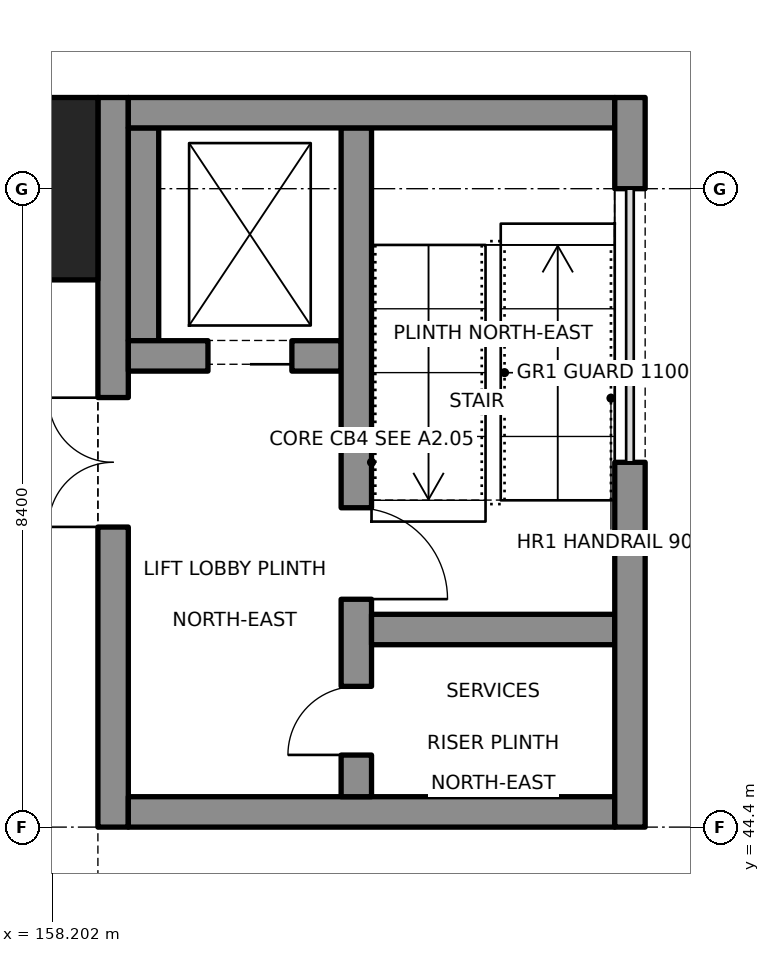
"""IFC4 building model, lengths in metres.
Left out: names, types, materials, properties, quantities, classifications, styles, units other than length and angle.
Written with IfcOpenShell. Run it as: python <this file> out.ifc"""

import sys

from ifc_helpers import new_model, si_unit, direction, frame, frame_2d, origin, origin_2d, place, context, subcontext, project, spatial, rectangle, extrude, element, fill, save


model = new_model("IFC4")
c1 = context("Model", 3, precision=1e-05, world=origin(), true_north=direction((0.0, 1.0)))
c2 = subcontext(c1, "Body", "Model", "MODEL_VIEW")
j1 = project(units=[si_unit("LENGTHUNIT", "METRE"), si_unit("PLANEANGLEUNIT", "RADIAN")], contexts=[c1])
p1 = place(None, origin())
s1 = spatial("IfcSite", under=j1, at=p1, CompositionType="ELEMENT")
p2 = place(p1, origin())
s2 = spatial("IfcBuilding", under=s1, at=p2, CompositionType="ELEMENT")
p3 = place(p2, frame((0.0, 0.0, 4.4)))
s3 = spatial("IfcBuildingStorey", under=s2, at=p3, CompositionType="ELEMENT", Elevation=4.4)
p4 = place(p3, frame((157.6, 52.8, 0.0), z_axis=(0.0, 0.0, 1.0), x_axis=(1.0, 0.0, 0.0)))
e1 = element("IfcColumn", 1, at=p4, inside=s3, PredefinedType="COLUMN", context=c2, shape_type="SweptSolid", body=[
    extrude(rectangle(XDim=2.4, YDim=2.4, at=origin_2d()), origin(), (0.0, 0.0, 1.0), 4.4),
])
p5 = place(p3, frame((165.8, 49.2, 0.0), z_axis=(0.0, 0.0, 1.0), x_axis=(0.0, -1.0, 0.0)))
e2 = element("IfcWall", 2, at=p5, inside=s3, PredefinedType="SHEAR", context=c2, shape_type="SweptSolid", body=[
    extrude(rectangle(XDim=4.8, YDim=0.4, at=frame_2d((2.4, 0.0))), origin(), (0.0, 0.0, 1.0), 4.4),
])
p6 = place(p3, frame((165.8, 54.0, 0.0), z_axis=(0.0, 0.0, 1.0), x_axis=(0.0, -1.0, 0.0)))
e3 = element("IfcWall", 3, at=p6, inside=s3, PredefinedType="SHEAR", context=c2, shape_type="SweptSolid", body=[
    extrude(rectangle(XDim=1.2, YDim=0.4, at=frame_2d((0.6, 0.0))), origin(), (0.0, 0.0, 1.0), 4.4),
])
p7 = place(p3, frame((159.0, 44.4, 0.0), z_axis=(0.0, 0.0, 1.0), x_axis=(0.0, 1.0, 0.0)))
e4 = element("IfcWall", 4, at=p7, inside=s3, PredefinedType="SHEAR", context=c2, shape_type="SweptSolid", body=[
    extrude(rectangle(XDim=9.6, YDim=0.4, at=frame_2d((4.8, 0.0))), origin(), (0.0, 0.0, 1.0), 4.4),
])
p8 = place(p7, frame((3.95, 0.0, 0.0)))
e5 = element("IfcOpeningElement", 5, at=p8, cuts=e4, PredefinedType="OPENING", context=c2, shape_type="SweptSolid", body=[
    extrude(rectangle(XDim=1.7, YDim=2.1, at=frame_2d((0.85, 1.05))), frame((0.0, 0.21, 0.0), z_axis=(0.0, -1.0, 0.0), x_axis=(1.0, 0.0, 0.0)), (0.0, 0.0, 1.0), 0.42),
])
for number, where, z_axis, x_axis in (
    (6, (159.2, 53.8, 0.0), (0.0, 0.0, 1.0), (1.0, 0.0, 0.0)),
    (7, (159.2, 44.6, 0.0), (0.0, 0.0, 1.0), (1.0, 0.0, 0.0)),
):
    element("IfcWall", number, at=place(p3, frame(where, z_axis=z_axis, x_axis=x_axis)), inside=s3, PredefinedType="SHEAR", context=c2, shape_type="SweptSolid", body=[
        extrude(rectangle(XDim=6.4, YDim=0.4, at=frame_2d((3.2, 0.0))), origin(), (0.0, 0.0, 1.0), 4.4),
    ])
p9 = place(p3, frame((162.2, 44.8, 0.0), z_axis=(0.0, 0.0, 1.0), x_axis=(0.0, 1.0, 0.0)))
e8 = element("IfcWall", 8, at=p9, inside=s3, PredefinedType="SHEAR", context=c2, shape_type="SweptSolid", body=[
    extrude(rectangle(XDim=8.8, YDim=0.4, at=frame_2d((4.4, 0.0))), origin(), (0.0, 0.0, 1.0), 4.4),
])
p10 = place(p9, frame((2.6, 0.0, 0.0)))
e9 = element("IfcOpeningElement", 9, at=p10, cuts=e8, PredefinedType="OPENING", context=c2, shape_type="SweptSolid", body=[
    extrude(rectangle(XDim=1.2, YDim=2.1, at=frame_2d((0.6, 1.05))), frame((0.0, 0.21, 0.0), z_axis=(0.0, -1.0, 0.0), x_axis=(1.0, 0.0, 0.0)), (0.0, 0.0, 1.0), 0.42),
])
p11 = place(p9, frame((0.55, 0.0, 0.0)))
e10 = element("IfcOpeningElement", 10, at=p11, cuts=e8, PredefinedType="OPENING", context=c2, shape_type="SweptSolid", body=[
    extrude(rectangle(XDim=0.9, YDim=2.1, at=frame_2d((0.45, 1.05))), frame((0.0, 0.21, 0.0), z_axis=(0.0, -1.0, 0.0), x_axis=(1.0, 0.0, 0.0)), (0.0, 0.0, 1.0), 0.42),
])
p12 = place(p3, frame((162.4, 47.0, 0.0), z_axis=(0.0, 0.0, 1.0), x_axis=(1.0, 0.0, 0.0)))
e11 = element("IfcWall", 11, at=p12, inside=s3, PredefinedType="SHEAR", context=c2, shape_type="SweptSolid", body=[
    extrude(rectangle(XDim=3.2, YDim=0.4, at=frame_2d((1.6, 0.0))), origin(), (0.0, 0.0, 1.0), 4.4),
])
p13 = place(p3, frame((159.2, 50.6, 0.0), z_axis=(0.0, 0.0, 1.0), x_axis=(1.0, 0.0, 0.0)))
e12 = element("IfcWall", 12, at=p13, inside=s3, PredefinedType="SHEAR", context=c2, shape_type="SweptSolid", body=[
    extrude(rectangle(XDim=2.8, YDim=0.4, at=frame_2d((1.4, 0.0))), origin(), (0.0, 0.0, 1.0), 4.4),
])
p14 = place(p13, frame((1.05, 0.0, 0.0)))
e13 = element("IfcOpeningElement", 13, at=p14, cuts=e12, PredefinedType="OPENING", context=c2, shape_type="SweptSolid", body=[
    extrude(rectangle(XDim=1.1, YDim=2.1, at=frame_2d((0.55, 1.05))), frame((0.0, 0.21, 0.0), z_axis=(0.0, -1.0, 0.0), x_axis=(1.0, 0.0, 0.0)), (0.0, 0.0, 1.0), 0.42),
])
p15 = place(p3, frame((159.4, 50.8, 0.0), z_axis=(0.0, 0.0, 1.0), x_axis=(0.0, 1.0, 0.0)))
e14 = element("IfcWall", 14, at=p15, inside=s3, PredefinedType="SHEAR", context=c2, shape_type="SweptSolid", body=[
    extrude(rectangle(XDim=2.8, YDim=0.4, at=frame_2d((1.4, 0.0))), origin(), (0.0, 0.0, 1.0), 4.4),
])
p16 = place(p8, origin())
e15 = element("IfcDoor", 15, at=p16, inside=s3, OperationType="DOUBLE_DOOR_SINGLE_SWING", PredefinedType="DOOR", context=c2, shape_type="SweptSolid", body=[
    extrude(rectangle(XDim=1.7, YDim=2.1, at=frame_2d((0.85, 1.05))), frame((0.0, 0.025, 0.0), z_axis=(0.0, -1.0, 0.0), x_axis=(1.0, 0.0, 0.0)), (0.0, 0.0, 1.0), 0.05),
])
fill(e5, e15)
p17 = place(p10, origin())
e16 = element("IfcDoor", 16, at=p17, inside=s3, OperationType="SINGLE_SWING_LEFT", PredefinedType="DOOR", context=c2, shape_type="SweptSolid", body=[
    extrude(rectangle(XDim=1.2, YDim=2.1, at=frame_2d((0.6, 1.05))), frame((0.0, 0.025, 0.0), z_axis=(0.0, -1.0, 0.0), x_axis=(1.0, 0.0, 0.0)), (0.0, 0.0, 1.0), 0.05),
])
fill(e9, e16)
p18 = place(p11, origin())
e17 = element("IfcDoor", 17, at=p18, inside=s3, OperationType="SINGLE_SWING_LEFT", PredefinedType="DOOR", context=c2, shape_type="SweptSolid", body=[
    extrude(rectangle(XDim=0.9, YDim=2.1, at=frame_2d((0.45, 1.05))), frame((0.0, 0.025, 0.0), z_axis=(0.0, -1.0, 0.0), x_axis=(1.0, 0.0, 0.0)), (0.0, 0.0, 1.0), 0.05),
])
fill(e10, e17)
p19 = place(p14, origin())
e18 = element("IfcDoor", 18, at=p19, inside=s3, OperationType="SLIDING_TO_LEFT", PredefinedType="DOOR", context=c2, shape_type="SweptSolid", body=[
    extrude(rectangle(XDim=1.1, YDim=2.1, at=frame_2d((0.55, 1.05))), frame((0.0, 0.025, 0.0), z_axis=(0.0, -1.0, 0.0), x_axis=(1.0, 0.0, 0.0)), (0.0, 0.0, 1.0), 0.05),
])
fill(e13, e18)
save(model, sys.argv[1])
